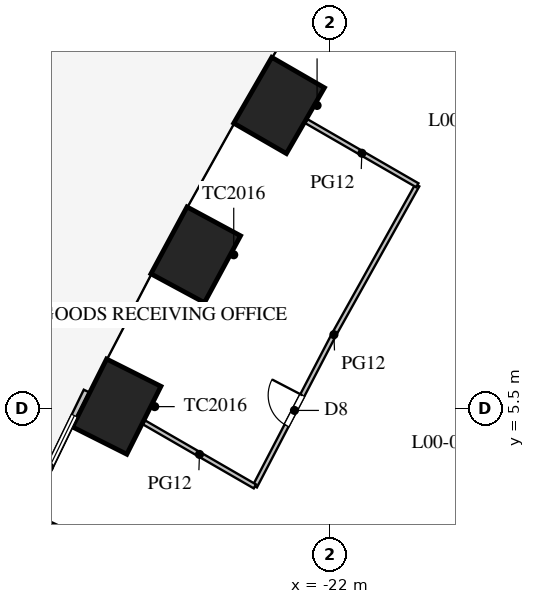
"""IFC4 building model, lengths in metres.
Left out: names, types, materials, properties, quantities, classifications, styles, units other than length and angle.
Written with IfcOpenShell. Run it as: python <this file> out.ifc"""

import sys

from ifc_helpers import new_model, si_unit, direction, frame, frame_2d, origin, origin_2d, place, context, subcontext, project, spatial, rectangle, extrude, element, fill, save


model = new_model("IFC4")
c1 = context("Model", 3, precision=1e-05, world=origin(), true_north=direction((0.0, 1.0)))
c2 = subcontext(c1, "Body", "Model", "MODEL_VIEW")
j1 = project(units=[si_unit("LENGTHUNIT", "METRE"), si_unit("PLANEANGLEUNIT", "RADIAN")], contexts=[c1])
p1 = place(None, origin())
s1 = spatial("IfcSite", under=j1, at=p1, CompositionType="ELEMENT")
p2 = place(p1, origin())
s2 = spatial("IfcBuilding", under=s1, at=p2, CompositionType="ELEMENT")
p3 = place(p2, origin())
s3 = spatial("IfcBuildingStorey", under=s2, at=p3, CompositionType="ELEMENT", Elevation=0.0)
for number, where, z_axis, x_axis in (
    (1, (-23.338, 13.474, 0.0), (0.0, 0.0, 1.0), (-0.5, -0.866, 0.0)),
    (2, (-25.531, 9.544, 0.0), (0.0, 0.0, 1.0), (-0.475, -0.88, 0.0)),
    (3, (-27.611, 5.549, 0.0), (0.0, 0.0, 1.0), (-0.449, -0.894, 0.0)),
    (4, (-29.576, 1.487, 0.0), (0.0, 0.0, 1.0), (-0.423, -0.906, 0.0)),
):
    element("IfcColumn", number, at=place(p3, frame(where, z_axis=z_axis, x_axis=x_axis)), inside=s3, PredefinedType="COLUMN", context=c2, shape_type="SweptSolid", body=[
        extrude(rectangle(XDim=2.0, YDim=1.6, at=origin_2d()), origin(), (0.0, 0.0, 1.0), 6.5),
    ])
p4 = place(p3, frame((-28.41, 5.961, 0.0), z_axis=(0.0, 0.0, 1.0), x_axis=(-0.435876976458, -0.900006256308, 0.0)))
e5 = element("IfcWall", 5, at=p4, inside=s3, PredefinedType="SOLIDWALL", context=c2, shape_type="SweptSolid", body=[
    extrude(rectangle(XDim=4.442, YDim=0.15, at=frame_2d((2.221, 0.0))), origin(), (0.0, 0.0, 1.0), 6.48),
])
p5 = place(p4, frame((0.721, 0.0, 0.0)))
e6 = element("IfcOpeningElement", 6, at=p5, cuts=e5, PredefinedType="OPENING", context=c2, shape_type="SweptSolid", body=[
    extrude(rectangle(XDim=3.0, YDim=4.5, at=frame_2d((1.5, 2.25))), frame((0.0, 0.085, 0.0), z_axis=(0.0, -1.0, 0.0), x_axis=(1.0, 0.0, 0.0)), (0.0, 0.0, 1.0), 0.17),
])
p6 = place(p3, frame((-19.701, 11.374, 0.0), z_axis=(0.0, 0.0, 1.0), x_axis=(-0.487415216275, -0.87317031955, 0.0)))
e7 = element("IfcWall", 7, at=p6, inside=s3, PredefinedType="PARTITIONING", context=c2, shape_type="SweptSolid", body=[
    extrude(rectangle(XDim=4.5, YDim=0.12, at=frame_2d((2.25, 0.0))), origin(), (0.0, 0.0, 1.0), 5.0),
])
p7 = place(p3, frame((-21.895, 7.445, 0.0), z_axis=(0.0, 0.0, 1.0), x_axis=(-0.461810056307, -0.886978845235, 0.0)))
e8 = element("IfcWall", 8, at=p7, inside=s3, PredefinedType="PARTITIONING", context=c2, shape_type="SweptSolid", body=[
    extrude(rectangle(XDim=4.504, YDim=0.12, at=frame_2d((2.252, 0.0))), origin(), (0.0, 0.0, 1.0), 5.0),
])
p8 = place(p7, frame((1.8, 0.0, 0.0)))
e9 = element("IfcOpeningElement", 9, at=p8, cuts=e8, PredefinedType="OPENING", context=c2, shape_type="SweptSolid", body=[
    extrude(rectangle(XDim=0.9, YDim=2.1, at=frame_2d((0.45, 1.05))), frame((0.0, 0.07, 0.0), z_axis=(0.0, -1.0, 0.0), x_axis=(1.0, 0.0, 0.0)), (0.0, 0.0, 1.0), 0.14),
])
p9 = place(p3, frame((-19.701, 11.374, 0.0), z_axis=(0.0, 0.0, 1.0), x_axis=(-0.866014270972, 0.500019282102, 0.0)))
e10 = element("IfcWall", 10, at=p9, inside=s3, PredefinedType="PARTITIONING", context=c2, shape_type="SweptSolid", body=[
    extrude(rectangle(XDim=3.37, YDim=0.12, at=frame_2d((1.685, 0.0))), origin(), (0.0, 0.0, 1.0), 5.0),
])
p10 = place(p3, frame((-23.975, 3.449, 0.0), z_axis=(0.0, 0.0, 1.0), x_axis=(-0.866039498442, 0.499975586543, 0.0)))
e11 = element("IfcWall", 11, at=p10, inside=s3, PredefinedType="PARTITIONING", context=c2, shape_type="SweptSolid", body=[
    extrude(rectangle(XDim=3.367, YDim=0.12, at=frame_2d((1.684, 0.0))), origin(), (0.0, 0.0, 1.0), 5.0),
])
p11 = place(p5, origin())
e12 = element("IfcDoor", 12, at=p11, inside=s3, OperationType="USERDEFINED", PredefinedType="USERDEFINED", context=c2, shape_type="SweptSolid", body=[
    extrude(rectangle(XDim=3.0, YDim=4.5, at=frame_2d((1.5, 2.25))), frame((0.0, 0.025, 0.0), z_axis=(0.0, -1.0, 0.0), x_axis=(1.0, 0.0, 0.0)), (0.0, 0.0, 1.0), 0.05),
])
fill(e6, e12)
p12 = place(p8, frame((0.9, 0.0, 0.0), z_axis=(0.0, 0.0, 1.0), x_axis=(-1.0, 0.0, 0.0)))
e13 = element("IfcDoor", 13, at=p12, inside=s3, OperationType="SINGLE_SWING_RIGHT", PredefinedType="DOOR", context=c2, shape_type="SweptSolid", body=[
    extrude(rectangle(XDim=0.9, YDim=2.1, at=frame_2d((0.45, 1.05))), frame((0.0, 0.025, 0.0), z_axis=(0.0, -1.0, 0.0), x_axis=(1.0, 0.0, 0.0)), (0.0, 0.0, 1.0), 0.05),
])
fill(e9, e13)
save(model, sys.argv[1])
